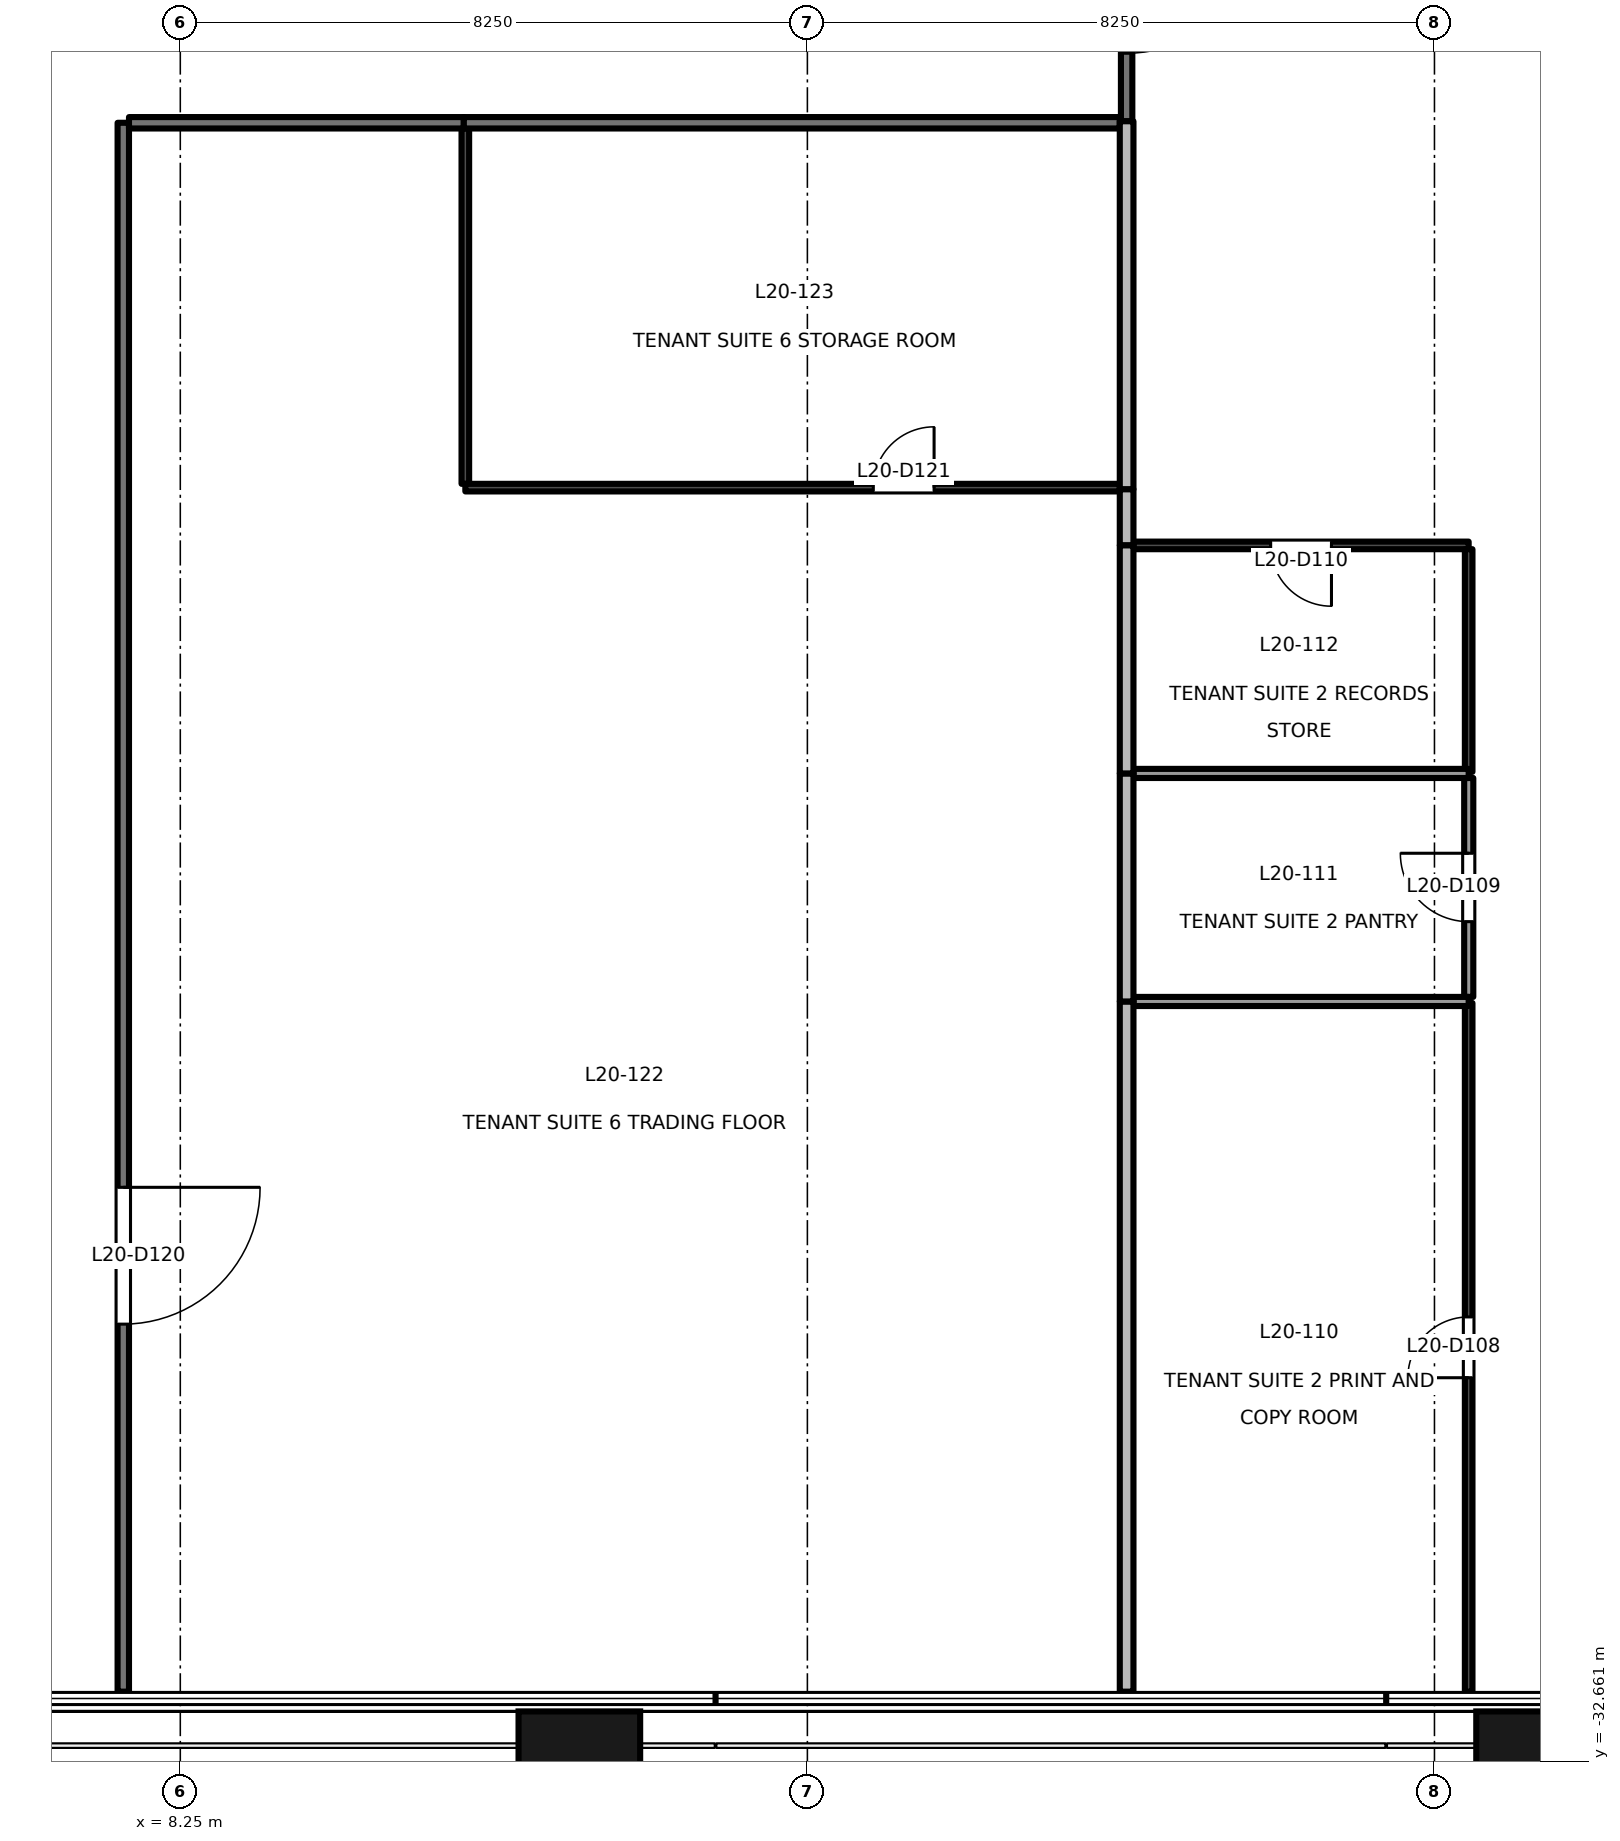
"""IFC4 building model, lengths in metres.
Left out: names, types, materials, properties, quantities, classifications, styles, units other than length and angle.
Written with IfcOpenShell. Run it as: python <this file> out.ifc"""

import sys

from ifc_helpers import new_model, si_unit, direction, frame, frame_2d, origin, origin_2d, place, context, subcontext, project, spatial, rectangle, extrude, element, fill, save


model = new_model("IFC4")
c1 = context("Model", 3, precision=1e-05, world=origin(), true_north=direction((0.0, 1.0)))
c2 = subcontext(c1, "Body", "Model", "MODEL_VIEW")
j1 = project(units=[si_unit("LENGTHUNIT", "METRE"), si_unit("PLANEANGLEUNIT", "RADIAN")], contexts=[c1])
p1 = place(None, origin())
s1 = spatial("IfcSite", under=j1, at=p1, CompositionType="ELEMENT")
p2 = place(p1, origin())
s2 = spatial("IfcBuilding", under=s1, at=p2, CompositionType="ELEMENT")
p3 = place(p2, frame((0.0, 0.0, 91.7)))
s3 = spatial("IfcBuildingStorey", under=s2, at=p3, CompositionType="ELEMENT", Elevation=91.7)
for number, where, z_axis, x_axis in (
    (1, (13.5, -32.9, -0.2), (0.0, 0.0, 1.0), (1.0, 0.0, 0.0)),
    (2, (26.1, -32.9, -0.2), (0.0, 0.0, 1.0), (1.0, 0.0, 0.0)),
):
    element("IfcColumn", number, at=place(p3, frame(where, z_axis=z_axis, x_axis=x_axis)), inside=s3, PredefinedType="COLUMN", context=c2, shape_type="SweptSolid", body=[
        extrude(rectangle(XDim=1.6, YDim=1.8, at=origin_2d()), origin(), (0.0, 0.0, 1.0), 4.0),
    ])
p4 = place(p3, frame((20.7, -7.49, 0.0), z_axis=(0.0, 0.0, 1.0), x_axis=(0.0, -1.0, 0.0)))
e3 = element("IfcWall", 3, at=p4, inside=s3, PredefinedType="PARTITIONING", context=c2, shape_type="SweptSolid", body=[
    extrude(rectangle(XDim=3.59, YDim=0.15, at=frame_2d((1.795, 0.0))), origin(), (0.0, 0.0, 1.0), 2.9),
])
p5 = place(p4, frame((0.895, 0.0, 0.0)))
e4 = element("IfcOpeningElement", 4, at=p5, cuts=e3, PredefinedType="OPENING", context=c2, shape_type="SweptSolid", body=[
    extrude(rectangle(XDim=1.8, YDim=2.1, at=frame_2d((0.9, 1.05))), frame((0.0, 0.085, 0.0), z_axis=(0.0, -1.0, 0.0), x_axis=(1.0, 0.0, 0.0)), (0.0, 0.0, 1.0), 0.171),
])
p6 = place(p3, frame((7.5, -11.1, 0.0), z_axis=(0.0, 0.0, 1.0), x_axis=(0.0, -1.0, 0.0)))
e5 = element("IfcWall", 5, at=p6, inside=s3, PredefinedType="PARTITIONING", context=c2, shape_type="SweptSolid", body=[
    extrude(rectangle(XDim=20.64, YDim=0.15, at=frame_2d((10.32, 0.0))), origin(), (0.0, 0.0, 1.0), 3.8),
])
p7 = place(p6, frame((14.005, 0.0, 0.0)))
e6 = element("IfcOpeningElement", 6, at=p7, cuts=e5, PredefinedType="OPENING", context=c2, shape_type="SweptSolid", body=[
    extrude(rectangle(XDim=1.8, YDim=2.1, at=frame_2d((0.9, 1.05))), frame((0.0, 0.085, 0.0), z_axis=(0.0, -1.0, 0.0), x_axis=(1.0, 0.0, 0.0)), (0.0, 0.0, 1.0), 0.171),
])
p8 = place(p3, frame((11.98, -11.1, 0.0), z_axis=(0.0, 0.0, 1.0), x_axis=(-1.0, 0.0, 0.0)))
e7 = element("IfcWall", 7, at=p8, inside=s3, PredefinedType="PARTITIONING", context=c2, shape_type="SweptSolid", body=[
    extrude(rectangle(XDim=4.405, YDim=0.15, at=frame_2d((2.203, 0.0))), origin(), (0.0, 0.0, 1.0), 2.8),
])
p9 = place(p3, frame((20.61, -11.1, 0.0), z_axis=(0.0, 0.0, 1.0), x_axis=(-1.0, 0.0, 0.0)))
e8 = element("IfcWall", 8, at=p9, inside=s3, PredefinedType="PARTITIONING", context=c2, shape_type="SweptSolid", body=[
    extrude(rectangle(XDim=8.63, YDim=0.15, at=frame_2d((4.315, 0.0))), origin(), (0.0, 0.0, 1.0), 2.4),
])
p10 = place(p3, frame((25.2, -31.74, 0.0), z_axis=(0.0, 0.0, 1.0), x_axis=(0.0, 1.0, 0.0)))
e9 = element("IfcWall", 9, at=p10, inside=s3, PredefinedType="PARTITIONING", context=c2, shape_type="SweptSolid", body=[
    extrude(rectangle(XDim=9.06, YDim=0.1, at=frame_2d((4.53, 0.0))), origin(), (0.0, 0.0, 1.0), 3.8),
])
p11 = place(p10, frame((4.13, 0.0, 0.0)))
e10 = element("IfcOpeningElement", 10, at=p11, cuts=e9, PredefinedType="OPENING", context=c2, shape_type="SweptSolid", body=[
    extrude(rectangle(XDim=0.8, YDim=2.1, at=frame_2d((0.4, 1.05))), frame((0.0, 0.061, 0.0), z_axis=(0.0, -1.0, 0.0), x_axis=(1.0, 0.0, 0.0)), (0.0, 0.0, 1.0), 0.121),
])
p12 = place(p3, frame((25.201, -22.6, 0.0), z_axis=(0.0, 0.0, 1.0), x_axis=(0.0, 1.0, 0.0)))
e11 = element("IfcWall", 11, at=p12, inside=s3, PredefinedType="PARTITIONING", context=c2, shape_type="SweptSolid", body=[
    extrude(rectangle(XDim=2.88, YDim=0.12, at=frame_2d((1.44, 0.0))), origin(), (0.0, 0.0, 1.0), 3.8),
])
p13 = place(p12, frame((0.99, 0.0, 0.0)))
e12 = element("IfcOpeningElement", 12, at=p13, cuts=e11, PredefinedType="OPENING", context=c2, shape_type="SweptSolid", body=[
    extrude(rectangle(XDim=0.9, YDim=2.1, at=frame_2d((0.45, 1.05))), frame((0.0, 0.071, 0.0), z_axis=(0.0, -1.0, 0.0), x_axis=(1.0, 0.0, 0.0)), (0.0, 0.0, 1.0), 0.141),
])
p14 = place(p3, frame((25.2, -16.66, 0.0), z_axis=(0.0, 0.0, 1.0), x_axis=(-1.0, 0.0, 0.0)))
e13 = element("IfcWall", 13, at=p14, inside=s3, PredefinedType="PARTITIONING", context=c2, shape_type="SweptSolid", body=[
    extrude(rectangle(XDim=4.41, YDim=0.1, at=frame_2d((2.205, 0.0))), origin(), (0.0, 0.0, 1.0), 3.8),
])
p15 = place(p14, frame((1.805, 0.0, 0.0)))
e14 = element("IfcOpeningElement", 14, at=p15, cuts=e13, PredefinedType="OPENING", context=c2, shape_type="SweptSolid", body=[
    extrude(rectangle(XDim=0.8, YDim=2.1, at=frame_2d((0.4, 1.05))), frame((0.0, 0.061, 0.0), z_axis=(0.0, -1.0, 0.0), x_axis=(1.0, 0.0, 0.0)), (0.0, 0.0, 1.0), 0.121),
])
p16 = place(p3, frame((25.2, -19.64, 0.0), z_axis=(0.0, 0.0, 1.0), x_axis=(0.0, 1.0, 0.0)))
e15 = element("IfcWall", 15, at=p16, inside=s3, PredefinedType="PARTITIONING", context=c2, shape_type="SweptSolid", body=[
    extrude(rectangle(XDim=2.93, YDim=0.1, at=frame_2d((1.465, 0.0))), origin(), (0.0, 0.0, 1.0), 3.8),
])
p17 = place(p3, frame((20.7, -16.66, 0.0), z_axis=(0.0, 0.0, 1.0), x_axis=(0.0, 1.0, 0.0)))
e16 = element("IfcWall", 16, at=p17, inside=s3, PredefinedType="PARTITIONING", context=c2, shape_type="SweptSolid", body=[
    extrude(rectangle(XDim=0.74, YDim=0.18, at=frame_2d((0.37, 0.0))), origin(), (0.0, 0.0, 1.0), 3.8),
])
p18 = place(p3, frame((20.7, -15.92, 0.0), z_axis=(0.0, 0.0, 1.0), x_axis=(0.0, 1.0, 0.0)))
e17 = element("IfcWall", 17, at=p18, inside=s3, PredefinedType="PARTITIONING", context=c2, shape_type="SweptSolid", body=[
    extrude(rectangle(XDim=4.84, YDim=0.18, at=frame_2d((2.42, 0.0))), origin(), (0.0, 0.0, 1.0), 2.9),
])
p19 = place(p3, frame((20.79, -22.66, 0.0), z_axis=(0.0, 0.0, 1.0), x_axis=(1.0, 0.0, 0.0)))
e18 = element("IfcWall", 18, at=p19, inside=s3, PredefinedType="PARTITIONING", context=c2, shape_type="SweptSolid", body=[
    extrude(rectangle(XDim=4.41, YDim=0.12, at=frame_2d((2.205, 0.0))), origin(), (0.0, 0.0, 1.0), 3.8),
])
p20 = place(p3, frame((20.7, -31.74, 0.0), z_axis=(0.0, 0.0, 1.0), x_axis=(0.0, 1.0, 0.0)))
e19 = element("IfcWall", 19, at=p20, inside=s3, PredefinedType="PARTITIONING", context=c2, shape_type="SweptSolid", body=[
    extrude(rectangle(XDim=9.08, YDim=0.18, at=frame_2d((4.54, 0.0))), origin(), (0.0, 0.0, 1.0), 3.8),
])
p21 = place(p3, frame((20.79, -19.66, 0.0), z_axis=(0.0, 0.0, 1.0), x_axis=(1.0, 0.0, 0.0)))
e20 = element("IfcWall", 20, at=p21, inside=s3, PredefinedType="PARTITIONING", context=c2, shape_type="SweptSolid", body=[
    extrude(rectangle(XDim=4.41, YDim=0.12, at=frame_2d((2.205, 0.0))), origin(), (0.0, 0.0, 1.0), 3.8),
])
for number, where, z_axis, x_axis in (
    (21, (20.7, -22.66, 0.0), (0.0, 0.0, 1.0), (0.0, 1.0, 0.0)),
    (22, (20.7, -19.66, 0.0), (0.0, 0.0, 1.0), (0.0, 1.0, 0.0)),
):
    element("IfcWall", number, at=place(p3, frame(where, z_axis=z_axis, x_axis=x_axis)), inside=s3, PredefinedType="PARTITIONING", context=c2, shape_type="SweptSolid", body=[
        extrude(rectangle(XDim=3.0, YDim=0.18, at=frame_2d((1.5, 0.0))), origin(), (0.0, 0.0, 1.0), 3.8),
    ])
p22 = place(p3, frame((12.0, -11.175, 0.0), z_axis=(0.0, 0.0, 1.0), x_axis=(0.0, -1.0, 0.0)))
e23 = element("IfcWall", 23, at=p22, inside=s3, PredefinedType="PARTITIONING", context=c2, shape_type="SweptSolid", body=[
    extrude(rectangle(XDim=4.675, YDim=0.1, at=frame_2d((2.337, 0.0))), origin(), (0.0, 0.0, 1.0), 3.8),
])
p23 = place(p3, frame((12.0, -15.9, 0.0), z_axis=(0.0, 0.0, 1.0), x_axis=(1.0, 0.0, 0.0)))
e24 = element("IfcWall", 24, at=p23, inside=s3, PredefinedType="PARTITIONING", context=c2, shape_type="SweptSolid", body=[
    extrude(rectangle(XDim=8.61, YDim=0.1, at=frame_2d((4.305, 0.0))), origin(), (0.0, 0.0, 1.0), 2.4),
])
p24 = place(p23, frame((5.367, 0.0, 0.0)))
e25 = element("IfcOpeningElement", 25, at=p24, cuts=e24, PredefinedType="OPENING", context=c2, shape_type="SweptSolid", body=[
    extrude(rectangle(XDim=0.8, YDim=2.1, at=frame_2d((0.4, 1.05))), frame((0.0, 0.061, 0.0), z_axis=(0.0, -1.0, 0.0), x_axis=(1.0, 0.0, 0.0)), (0.0, 0.0, 1.0), 0.121),
])
p25 = place(p5, origin())
e26 = element("IfcDoor", 26, at=p25, inside=s3, OperationType="DOUBLE_DOOR_SINGLE_SWING", PredefinedType="DOOR", context=c2, shape_type="SweptSolid", body=[
    extrude(rectangle(XDim=1.8, YDim=2.1, at=frame_2d((0.9, 1.05))), frame((0.0, 0.025, 0.0), z_axis=(0.0, -1.0, 0.0), x_axis=(1.0, 0.0, 0.0)), (0.0, 0.0, 1.0), 0.05),
])
fill(e4, e26)
p26 = place(p11, origin())
e27 = element("IfcDoor", 27, at=p26, inside=s3, OperationType="SINGLE_SWING_LEFT", PredefinedType="DOOR", context=c2, shape_type="SweptSolid", body=[
    extrude(rectangle(XDim=0.8, YDim=2.1, at=frame_2d((0.4, 1.05))), frame((0.0, 0.025, 0.0), z_axis=(0.0, -1.0, 0.0), x_axis=(1.0, 0.0, 0.0)), (0.0, 0.0, 1.0), 0.05),
])
fill(e10, e27)
p27 = place(p13, origin())
e28 = element("IfcDoor", 28, at=p27, inside=s3, OperationType="SINGLE_SWING_RIGHT", PredefinedType="DOOR", context=c2, shape_type="SweptSolid", body=[
    extrude(rectangle(XDim=0.9, YDim=2.1, at=frame_2d((0.45, 1.05))), frame((0.0, 0.025, 0.0), z_axis=(0.0, -1.0, 0.0), x_axis=(1.0, 0.0, 0.0)), (0.0, 0.0, 1.0), 0.05),
])
fill(e12, e28)
p28 = place(p15, origin())
e29 = element("IfcDoor", 29, at=p28, inside=s3, OperationType="SINGLE_SWING_LEFT", PredefinedType="DOOR", context=c2, shape_type="SweptSolid", body=[
    extrude(rectangle(XDim=0.8, YDim=2.1, at=frame_2d((0.4, 1.05))), frame((0.0, 0.025, 0.0), z_axis=(0.0, -1.0, 0.0), x_axis=(1.0, 0.0, 0.0)), (0.0, 0.0, 1.0), 0.05),
])
fill(e14, e29)
p29 = place(p7, origin())
e30 = element("IfcDoor", 30, at=p29, inside=s3, OperationType="DOUBLE_DOOR_SINGLE_SWING", PredefinedType="DOOR", context=c2, shape_type="SweptSolid", body=[
    extrude(rectangle(XDim=1.8, YDim=2.1, at=frame_2d((0.9, 1.05))), frame((0.0, 0.025, 0.0), z_axis=(0.0, -1.0, 0.0), x_axis=(1.0, 0.0, 0.0)), (0.0, 0.0, 1.0), 0.05),
])
fill(e6, e30)
p30 = place(p24, origin())
e31 = element("IfcDoor", 31, at=p30, inside=s3, OperationType="SINGLE_SWING_RIGHT", PredefinedType="DOOR", context=c2, shape_type="SweptSolid", body=[
    extrude(rectangle(XDim=0.8, YDim=2.1, at=frame_2d((0.4, 1.05))), frame((0.0, 0.025, 0.0), z_axis=(0.0, -1.0, 0.0), x_axis=(1.0, 0.0, 0.0)), (0.0, 0.0, 1.0), 0.05),
])
fill(e25, e31)
save(model, sys.argv[1])
